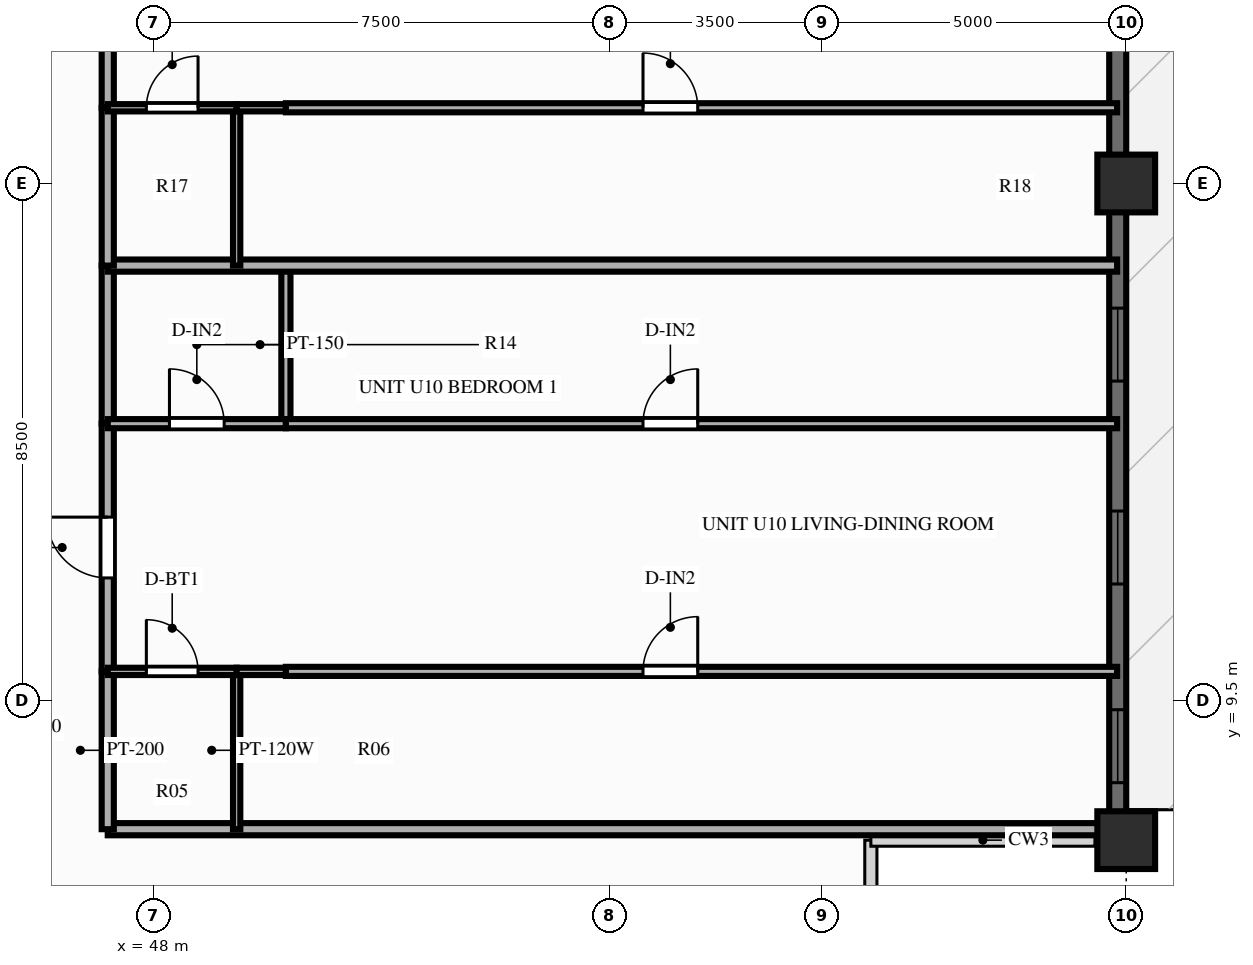
"""IFC4 building model, lengths in metres.
Left out: names, types, materials, properties, quantities, classifications, styles, units other than length and angle.
Written with IfcOpenShell. Run it as: python <this file> out.ifc"""

import sys

from ifc_helpers import new_model, si_unit, direction, frame, frame_2d, origin, origin_2d, place, context, subcontext, project, spatial, rectangle, extrude, source, transform, mapped, element, fill, save


model = new_model("IFC4")
c1 = context("Model", 3, precision=1e-05, world=origin(), true_north=direction((0.0, 1.0)))
c2 = subcontext(c1, "Body", "Model", "MODEL_VIEW")
j1 = project(units=[si_unit("LENGTHUNIT", "METRE"), si_unit("PLANEANGLEUNIT", "RADIAN")], contexts=[c1])
p1 = place(None, origin())
s1 = spatial("IfcSite", under=j1, at=p1, CompositionType="ELEMENT")
p2 = place(p1, origin())
s2 = spatial("IfcBuilding", under=s1, at=p2, CompositionType="ELEMENT")
p3 = place(p2, frame((0.0, 0.0, 107.85)))
s3 = spatial("IfcBuildingStorey", under=s2, at=p3, CompositionType="ELEMENT", Elevation=107.85)
m1 = source(origin(), c2, "Body", "SweptSolid", [
    extrude(rectangle(XDim=0.95, YDim=0.95, at=origin_2d()), origin(), (0.0, 0.0, 1.0), 3.0),
])
for number, where, z_axis, x_axis in (
    (1, (64.0, 7.2, 0.0), (0.0, 0.0, 1.0), (1.0, 0.0, 0.0)),
    (2, (64.0, 18.0, 0.0), (0.0, 0.0, 1.0), (1.0, 0.0, 0.0)),
):
    element("IfcColumn", number, at=place(p3, frame(where, z_axis=z_axis, x_axis=x_axis)), inside=s3, PredefinedType="COLUMN", context=c2, shape_type="MappedRepresentation", body=[
        mapped(m1, transform((0.0, 0.0, 0.0), scale=1.0)),
    ])
p4 = place(p3, frame((63.86, 7.2, 0.0), z_axis=(0.0, 0.0, 1.0), x_axis=(0.0, 1.0, 0.0)))
e3 = element("IfcWall", 3, at=p4, inside=s3, PredefinedType="SOLIDWALL", context=c2, shape_type="SweptSolid", body=[
    extrude(rectangle(XDim=39.6, YDim=0.28, at=frame_2d((19.8, 0.0))), origin(), (0.0, 0.0, 1.0), 2.28),
])
p5 = place(p4, frame((0.945, 0.0, 0.25)))
e4 = element("IfcOpeningElement", 4, at=p5, cuts=e3, PredefinedType="OPENING", context=c2, shape_type="SweptSolid", body=[
    extrude(rectangle(XDim=1.2, YDim=1.5, at=frame_2d((0.6, 0.75))), frame((0.0, 0.152, 0.0), z_axis=(0.0, -1.0, 0.0), x_axis=(1.0, 0.0, 0.0)), (0.0, 0.0, 1.0), 0.304),
])
p6 = place(p4, frame((4.213, 0.0, 0.25)))
e5 = element("IfcOpeningElement", 5, at=p6, cuts=e3, PredefinedType="OPENING", context=c2, shape_type="SweptSolid", body=[
    extrude(rectangle(XDim=1.2, YDim=1.5, at=frame_2d((0.6, 0.75))), frame((0.0, 0.152, 0.0), z_axis=(0.0, -1.0, 0.0), x_axis=(1.0, 0.0, 0.0)), (0.0, 0.0, 1.0), 0.304),
])
p7 = place(p4, frame((7.55, 0.0, 0.25)))
e6 = element("IfcOpeningElement", 6, at=p7, cuts=e3, PredefinedType="OPENING", context=c2, shape_type="SweptSolid", body=[
    extrude(rectangle(XDim=1.2, YDim=1.5, at=frame_2d((0.6, 0.75))), frame((0.0, 0.152, 0.0), z_axis=(0.0, -1.0, 0.0), x_axis=(1.0, 0.0, 0.0)), (0.0, 0.0, 1.0), 0.304),
])
p8 = place(p4, frame((13.483, 0.0, 0.25)))
e7 = element("IfcOpeningElement", 7, at=p8, cuts=e3, PredefinedType="OPENING", context=c2, shape_type="SweptSolid", body=[
    extrude(rectangle(XDim=1.2, YDim=1.5, at=frame_2d((0.6, 0.75))), frame((0.0, 0.152, 0.0), z_axis=(0.0, -1.0, 0.0), x_axis=(1.0, 0.0, 0.0)), (0.0, 0.0, 1.0), 0.304),
])
p9 = place(p4, frame((16.82, 0.0, 0.25)))
e8 = element("IfcOpeningElement", 8, at=p9, cuts=e3, PredefinedType="OPENING", context=c2, shape_type="SweptSolid", body=[
    extrude(rectangle(XDim=1.2, YDim=1.5, at=frame_2d((0.6, 0.75))), frame((0.0, 0.152, 0.0), z_axis=(0.0, -1.0, 0.0), x_axis=(1.0, 0.0, 0.0)), (0.0, 0.0, 1.0), 0.304),
])
p10 = place(p4, frame((19.2, 0.0, 0.25)))
e9 = element("IfcOpeningElement", 9, at=p10, cuts=e3, PredefinedType="OPENING", context=c2, shape_type="SweptSolid", body=[
    extrude(rectangle(XDim=1.2, YDim=1.5, at=frame_2d((0.6, 0.75))), frame((0.0, 0.152, 0.0), z_axis=(0.0, -1.0, 0.0), x_axis=(1.0, 0.0, 0.0)), (0.0, 0.0, 1.0), 0.304),
])
p11 = place(p4, frame((21.578, 0.0, 0.25)))
e10 = element("IfcOpeningElement", 10, at=p11, cuts=e3, PredefinedType="OPENING", context=c2, shape_type="SweptSolid", body=[
    extrude(rectangle(XDim=1.2, YDim=1.5, at=frame_2d((0.6, 0.75))), frame((0.0, 0.152, 0.0), z_axis=(0.0, -1.0, 0.0), x_axis=(1.0, 0.0, 0.0)), (0.0, 0.0, 1.0), 0.304),
])
p12 = place(p4, frame((26.313, 0.0, 0.0), z_axis=(0.0, 0.0, 1.0), x_axis=(-1.0, 0.0, 0.0)))
e11 = element("IfcOpeningElement", 11, at=p12, cuts=e3, PredefinedType="OPENING", context=c2, shape_type="SweptSolid", body=[
    extrude(rectangle(XDim=1.6, YDim=2.15, at=frame_2d((0.8, 1.075))), frame((0.0, 0.152, 0.0), z_axis=(0.0, -1.0, 0.0), x_axis=(1.0, 0.0, 0.0)), (0.0, 0.0, 1.0), 0.304),
])
p13 = place(p4, frame((29.305, 0.0, 0.25)))
e12 = element("IfcOpeningElement", 12, at=p13, cuts=e3, PredefinedType="OPENING", context=c2, shape_type="SweptSolid", body=[
    extrude(rectangle(XDim=0.7, YDim=1.5, at=frame_2d((0.35, 0.75))), frame((0.0, 0.152, 0.0), z_axis=(0.0, -1.0, 0.0), x_axis=(1.0, 0.0, 0.0)), (0.0, 0.0, 1.0), 0.304),
])
p14 = place(p4, frame((30.848, 0.0, 0.25)))
e13 = element("IfcOpeningElement", 13, at=p14, cuts=e3, PredefinedType="OPENING", context=c2, shape_type="SweptSolid", body=[
    extrude(rectangle(XDim=1.2, YDim=1.5, at=frame_2d((0.6, 0.75))), frame((0.0, 0.152, 0.0), z_axis=(0.0, -1.0, 0.0), x_axis=(1.0, 0.0, 0.0)), (0.0, 0.0, 1.0), 0.304),
])
p15 = place(p4, frame((34.183, 0.0, 0.25)))
e14 = element("IfcOpeningElement", 14, at=p15, cuts=e3, PredefinedType="OPENING", context=c2, shape_type="SweptSolid", body=[
    extrude(rectangle(XDim=1.2, YDim=1.5, at=frame_2d((0.6, 0.75))), frame((0.0, 0.152, 0.0), z_axis=(0.0, -1.0, 0.0), x_axis=(1.0, 0.0, 0.0)), (0.0, 0.0, 1.0), 0.304),
])
p16 = place(p4, frame((37.452, 0.0, 0.25)))
e15 = element("IfcOpeningElement", 15, at=p16, cuts=e3, PredefinedType="OPENING", context=c2, shape_type="SweptSolid", body=[
    extrude(rectangle(XDim=1.2, YDim=1.5, at=frame_2d((0.6, 0.75))), frame((0.0, 0.152, 0.0), z_axis=(0.0, -1.0, 0.0), x_axis=(1.0, 0.0, 0.0)), (0.0, 0.0, 1.0), 0.304),
])
p17 = place(p3, frame((47.25, 7.38, 0.0), z_axis=(0.0, 0.0, 1.0), x_axis=(1.0, 0.0, 0.0)))
e16 = element("IfcWall", 16, at=p17, inside=s3, PredefinedType="PARTITIONING", context=c2, shape_type="SweptSolid", body=[
    extrude(rectangle(XDim=16.6, YDim=0.2, at=frame_2d((8.3, 0.0))), origin(), (0.0, 0.0, 1.0), 2.79),
])
p18 = place(p3, frame((47.25, 7.38, 0.0), z_axis=(0.0, 0.0, 1.0), x_axis=(0.0, 1.0, 0.0)))
e17 = element("IfcWall", 17, at=p18, inside=s3, PredefinedType="PARTITIONING", context=c2, shape_type="SweptSolid", body=[
    extrude(rectangle(XDim=2.596, YDim=0.2, at=frame_2d((1.298, 0.0))), origin(), (0.0, 0.0, 1.0), 2.79),
])
p19 = place(p3, frame((47.25, 9.976, 0.0), z_axis=(0.0, 0.0, 1.0), x_axis=(0.0, 1.0, 0.0)))
e18 = element("IfcWall", 18, at=p19, inside=s3, PredefinedType="PARTITIONING", context=c2, shape_type="SweptSolid", body=[
    extrude(rectangle(XDim=4.074, YDim=0.2, at=frame_2d((2.037, 0.0))), origin(), (0.0, 0.0, 1.0), 2.79),
])
p20 = place(p19, frame((1.537, 0.0, 0.0)))
e19 = element("IfcOpeningElement", 19, at=p20, cuts=e18, PredefinedType="OPENING", context=c2, shape_type="SweptSolid", body=[
    extrude(rectangle(XDim=1.0, YDim=2.15, at=frame_2d((0.5, 1.075))), frame((0.0, 0.112, 0.0), z_axis=(0.0, -1.0, 0.0), x_axis=(1.0, 0.0, 0.0)), (0.0, 0.0, 1.0), 0.224),
])
p21 = place(p3, frame((47.25, 14.05, 0.0), z_axis=(0.0, 0.0, 1.0), x_axis=(0.0, 1.0, 0.0)))
e20 = element("IfcWall", 20, at=p21, inside=s3, PredefinedType="PARTITIONING", context=c2, shape_type="SweptSolid", body=[
    extrude(rectangle(XDim=2.6, YDim=0.2, at=frame_2d((1.3, 0.0))), origin(), (0.0, 0.0, 1.0), 2.79),
])
p22 = place(p3, frame((49.37, 7.38, 0.0), z_axis=(0.0, 0.0, 1.0), x_axis=(0.0, 1.0, 0.0)))
e21 = element("IfcWall", 21, at=p22, inside=s3, PredefinedType="PARTITIONING", context=c2, shape_type="SweptSolid", body=[
    extrude(rectangle(XDim=2.596, YDim=0.12, at=frame_2d((1.298, 0.0))), origin(), (0.0, 0.0, 1.0), 2.79),
])
p23 = place(p3, frame((50.18, 14.05, 0.0), z_axis=(0.0, 0.0, 1.0), x_axis=(0.0, 1.0, 0.0)))
e22 = element("IfcWall", 22, at=p23, inside=s3, PredefinedType="PARTITIONING", context=c2, shape_type="SweptSolid", body=[
    extrude(rectangle(XDim=2.6, YDim=0.15, at=frame_2d((1.3, 0.0))), origin(), (0.0, 0.0, 1.0), 2.79),
])
p24 = place(p3, frame((47.25, 9.976, 0.0), z_axis=(0.0, 0.0, 1.0), x_axis=(1.0, 0.0, 0.0)))
e23 = element("IfcWall", 23, at=p24, inside=s3, PredefinedType="PARTITIONING", context=c2, shape_type="SweptSolid", body=[
    extrude(rectangle(XDim=2.12, YDim=0.12, at=frame_2d((1.06, 0.0))), origin(), (0.0, 0.0, 1.0), 2.79),
])
p25 = place(p24, frame((0.635, 0.0, 0.0)))
e24 = element("IfcOpeningElement", 24, at=p25, cuts=e23, PredefinedType="OPENING", context=c2, shape_type="SweptSolid", body=[
    extrude(rectangle(XDim=0.85, YDim=2.05, at=frame_2d((0.425, 1.025))), frame((0.0, 0.072, 0.0), z_axis=(0.0, -1.0, 0.0), x_axis=(1.0, 0.0, 0.0)), (0.0, 0.0, 1.0), 0.144),
])
p26 = place(p3, frame((49.37, 9.976, 0.0), z_axis=(0.0, 0.0, 1.0), x_axis=(1.0, 0.0, 0.0)))
e25 = element("IfcWall", 25, at=p26, inside=s3, PredefinedType="PARTITIONING", context=c2, shape_type="SweptSolid", body=[
    extrude(rectangle(XDim=0.81, YDim=0.12, at=frame_2d((0.405, 0.0))), origin(), (0.0, 0.0, 1.0), 2.79),
])
p27 = place(p3, frame((50.18, 9.976, 0.0), z_axis=(0.0, 0.0, 1.0), x_axis=(1.0, 0.0, 0.0)))
e26 = element("IfcWall", 26, at=p27, inside=s3, PredefinedType="PARTITIONING", context=c2, shape_type="SweptSolid", body=[
    extrude(rectangle(XDim=13.67, YDim=0.15, at=frame_2d((6.835, 0.0))), origin(), (0.0, 0.0, 1.0), 2.79),
])
p28 = place(p27, frame((5.873, 0.0, 0.0)))
e27 = element("IfcOpeningElement", 27, at=p28, cuts=e26, PredefinedType="OPENING", context=c2, shape_type="SweptSolid", body=[
    extrude(rectangle(XDim=0.9, YDim=2.1, at=frame_2d((0.45, 1.05))), frame((0.0, 0.087, 0.0), z_axis=(0.0, -1.0, 0.0), x_axis=(1.0, 0.0, 0.0)), (0.0, 0.0, 1.0), 0.174),
])
p29 = place(p3, frame((47.25, 14.05, 0.0), z_axis=(0.0, 0.0, 1.0), x_axis=(1.0, 0.0, 0.0)))
e28 = element("IfcWall", 28, at=p29, inside=s3, PredefinedType="PARTITIONING", context=c2, shape_type="SweptSolid", body=[
    extrude(rectangle(XDim=2.93, YDim=0.15, at=frame_2d((1.465, 0.0))), origin(), (0.0, 0.0, 1.0), 2.79),
])
p30 = place(p29, frame((1.015, 0.0, 0.0)))
e29 = element("IfcOpeningElement", 29, at=p30, cuts=e28, PredefinedType="OPENING", context=c2, shape_type="SweptSolid", body=[
    extrude(rectangle(XDim=0.9, YDim=2.1, at=frame_2d((0.45, 1.05))), frame((0.0, 0.087, 0.0), z_axis=(0.0, -1.0, 0.0), x_axis=(1.0, 0.0, 0.0)), (0.0, 0.0, 1.0), 0.174),
])
p31 = place(p3, frame((50.18, 14.05, 0.0), z_axis=(0.0, 0.0, 1.0), x_axis=(1.0, 0.0, 0.0)))
e30 = element("IfcWall", 30, at=p31, inside=s3, PredefinedType="PARTITIONING", context=c2, shape_type="SweptSolid", body=[
    extrude(rectangle(XDim=13.67, YDim=0.15, at=frame_2d((6.835, 0.0))), origin(), (0.0, 0.0, 1.0), 2.79),
])
p32 = place(p31, frame((5.873, 0.0, 0.0)))
e31 = element("IfcOpeningElement", 31, at=p32, cuts=e30, PredefinedType="OPENING", context=c2, shape_type="SweptSolid", body=[
    extrude(rectangle(XDim=0.9, YDim=2.1, at=frame_2d((0.45, 1.05))), frame((0.0, 0.087, 0.0), z_axis=(0.0, -1.0, 0.0), x_axis=(1.0, 0.0, 0.0)), (0.0, 0.0, 1.0), 0.174),
])
p33 = place(p3, frame((47.25, 16.65, 0.0), z_axis=(0.0, 0.0, 1.0), x_axis=(1.0, 0.0, 0.0)))
e32 = element("IfcWall", 32, at=p33, inside=s3, PredefinedType="PARTITIONING", context=c2, shape_type="SweptSolid", body=[
    extrude(rectangle(XDim=16.6, YDim=0.2, at=frame_2d((8.3, 0.0))), origin(), (0.0, 0.0, 1.0), 2.79),
])
p34 = place(p3, frame((47.25, 16.65, 0.0), z_axis=(0.0, 0.0, 1.0), x_axis=(0.0, 1.0, 0.0)))
e33 = element("IfcWall", 33, at=p34, inside=s3, PredefinedType="PARTITIONING", context=c2, shape_type="SweptSolid", body=[
    extrude(rectangle(XDim=2.596, YDim=0.2, at=frame_2d((1.298, 0.0))), origin(), (0.0, 0.0, 1.0), 2.79),
])
p35 = place(p3, frame((47.25, 19.246, 0.0), z_axis=(0.0, 0.0, 1.0), x_axis=(0.0, 1.0, 0.0)))
e34 = element("IfcWall", 34, at=p35, inside=s3, PredefinedType="PARTITIONING", context=c2, shape_type="SweptSolid", body=[
    extrude(rectangle(XDim=4.074, YDim=0.2, at=frame_2d((2.037, 0.0))), origin(), (0.0, 0.0, 1.0), 2.79),
])
p36 = place(p35, frame((1.537, 0.0, 0.0)))
e35 = element("IfcOpeningElement", 35, at=p36, cuts=e34, PredefinedType="OPENING", context=c2, shape_type="SweptSolid", body=[
    extrude(rectangle(XDim=1.0, YDim=2.15, at=frame_2d((0.5, 1.075))), frame((0.0, 0.112, 0.0), z_axis=(0.0, -1.0, 0.0), x_axis=(1.0, 0.0, 0.0)), (0.0, 0.0, 1.0), 0.224),
])
p37 = place(p3, frame((49.37, 16.65, 0.0), z_axis=(0.0, 0.0, 1.0), x_axis=(0.0, 1.0, 0.0)))
e36 = element("IfcWall", 36, at=p37, inside=s3, PredefinedType="PARTITIONING", context=c2, shape_type="SweptSolid", body=[
    extrude(rectangle(XDim=2.596, YDim=0.12, at=frame_2d((1.298, 0.0))), origin(), (0.0, 0.0, 1.0), 2.79),
])
p38 = place(p3, frame((47.25, 19.246, 0.0), z_axis=(0.0, 0.0, 1.0), x_axis=(1.0, 0.0, 0.0)))
e37 = element("IfcWall", 37, at=p38, inside=s3, PredefinedType="PARTITIONING", context=c2, shape_type="SweptSolid", body=[
    extrude(rectangle(XDim=2.12, YDim=0.12, at=frame_2d((1.06, 0.0))), origin(), (0.0, 0.0, 1.0), 2.79),
])
p39 = place(p38, frame((0.635, 0.0, 0.0)))
e38 = element("IfcOpeningElement", 38, at=p39, cuts=e37, PredefinedType="OPENING", context=c2, shape_type="SweptSolid", body=[
    extrude(rectangle(XDim=0.85, YDim=2.05, at=frame_2d((0.425, 1.025))), frame((0.0, 0.072, 0.0), z_axis=(0.0, -1.0, 0.0), x_axis=(1.0, 0.0, 0.0)), (0.0, 0.0, 1.0), 0.144),
])
p40 = place(p3, frame((49.37, 19.246, 0.0), z_axis=(0.0, 0.0, 1.0), x_axis=(1.0, 0.0, 0.0)))
e39 = element("IfcWall", 39, at=p40, inside=s3, PredefinedType="PARTITIONING", context=c2, shape_type="SweptSolid", body=[
    extrude(rectangle(XDim=0.81, YDim=0.12, at=frame_2d((0.405, 0.0))), origin(), (0.0, 0.0, 1.0), 2.79),
])
p41 = place(p3, frame((50.18, 19.246, 0.0), z_axis=(0.0, 0.0, 1.0), x_axis=(1.0, 0.0, 0.0)))
e40 = element("IfcWall", 40, at=p41, inside=s3, PredefinedType="PARTITIONING", context=c2, shape_type="SweptSolid", body=[
    extrude(rectangle(XDim=13.67, YDim=0.15, at=frame_2d((6.835, 0.0))), origin(), (0.0, 0.0, 1.0), 2.79),
])
p42 = place(p41, frame((5.873, 0.0, 0.0)))
e41 = element("IfcOpeningElement", 41, at=p42, cuts=e40, PredefinedType="OPENING", context=c2, shape_type="SweptSolid", body=[
    extrude(rectangle(XDim=0.9, YDim=2.1, at=frame_2d((0.45, 1.05))), frame((0.0, 0.087, 0.0), z_axis=(0.0, -1.0, 0.0), x_axis=(1.0, 0.0, 0.0)), (0.0, 0.0, 1.0), 0.174),
])
m2 = source(origin(), c2, "Body", "SweptSolid", [
    extrude(rectangle(XDim=1.2, YDim=1.5, at=frame_2d((0.6, 0.75))), frame((0.0, 0.03, 0.0), z_axis=(0.0, -1.0, 0.0), x_axis=(1.0, 0.0, 0.0)), (0.0, 0.0, 1.0), 0.06),
])
p43 = place(p5, origin())
e42 = element("IfcWindow", 42, at=p43, inside=s3, PartitioningType="SINGLE_PANEL", PredefinedType="WINDOW", context=c2, shape_type="MappedRepresentation", body=[
    mapped(m2, transform((0.0, 0.0, 0.0), scale=1.0)),
])
fill(e4, e42)
p44 = place(p6, origin())
e43 = element("IfcWindow", 43, at=p44, inside=s3, PartitioningType="SINGLE_PANEL", PredefinedType="WINDOW", context=c2, shape_type="MappedRepresentation", body=[
    mapped(m2, transform((0.0, 0.0, 0.0), scale=1.0)),
])
fill(e5, e43)
p45 = place(p7, origin())
e44 = element("IfcWindow", 44, at=p45, inside=s3, PartitioningType="SINGLE_PANEL", PredefinedType="WINDOW", context=c2, shape_type="MappedRepresentation", body=[
    mapped(m2, transform((0.0, 0.0, 0.0), scale=1.0)),
])
fill(e6, e44)
m3 = source(origin(), c2, "Body", "SweptSolid", [
    extrude(rectangle(XDim=1.0, YDim=2.15, at=frame_2d((0.5, 1.075))), frame((0.0, 0.025, 0.0), z_axis=(0.0, -1.0, 0.0), x_axis=(1.0, 0.0, 0.0)), (0.0, 0.0, 1.0), 0.05),
])
p46 = place(p20, origin())
e45 = element("IfcDoor", 45, at=p46, inside=s3, OperationType="SINGLE_SWING_RIGHT", PredefinedType="DOOR", context=c2, shape_type="MappedRepresentation", body=[
    mapped(m3, transform((0.0, 0.0, 0.0), scale=1.0)),
])
fill(e19, e45)
m4 = source(origin(), c2, "Body", "SweptSolid", [
    extrude(rectangle(XDim=0.85, YDim=2.05, at=frame_2d((0.425, 1.025))), frame((0.0, 0.025, 0.0), z_axis=(0.0, -1.0, 0.0), x_axis=(1.0, 0.0, 0.0)), (0.0, 0.0, 1.0), 0.05),
])
p47 = place(p25, origin())
e46 = element("IfcDoor", 46, at=p47, inside=s3, OperationType="SINGLE_SWING_LEFT", PredefinedType="DOOR", context=c2, shape_type="MappedRepresentation", body=[
    mapped(m4, transform((0.0, 0.0, 0.0), scale=1.0)),
])
fill(e24, e46)
m5 = source(origin(), c2, "Body", "SweptSolid", [
    extrude(rectangle(XDim=0.9, YDim=2.1, at=frame_2d((0.45, 1.05))), frame((0.0, 0.025, 0.0), z_axis=(0.0, -1.0, 0.0), x_axis=(1.0, 0.0, 0.0)), (0.0, 0.0, 1.0), 0.05),
])
p48 = place(p28, origin())
e47 = element("IfcDoor", 47, at=p48, inside=s3, OperationType="SINGLE_SWING_RIGHT", PredefinedType="DOOR", context=c2, shape_type="MappedRepresentation", body=[
    mapped(m5, transform((0.0, 0.0, 0.0), scale=1.0)),
])
fill(e27, e47)
p49 = place(p30, origin())
e48 = element("IfcDoor", 48, at=p49, inside=s3, OperationType="SINGLE_SWING_LEFT", PredefinedType="DOOR", context=c2, shape_type="MappedRepresentation", body=[
    mapped(m5, transform((0.0, 0.0, 0.0), scale=1.0)),
])
fill(e29, e48)
p50 = place(p32, origin())
e49 = element("IfcDoor", 49, at=p50, inside=s3, OperationType="SINGLE_SWING_RIGHT", PredefinedType="DOOR", context=c2, shape_type="MappedRepresentation", body=[
    mapped(m5, transform((0.0, 0.0, 0.0), scale=1.0)),
])
fill(e31, e49)
p51 = place(p39, origin())
e50 = element("IfcDoor", 50, at=p51, inside=s3, OperationType="SINGLE_SWING_RIGHT", PredefinedType="DOOR", context=c2, shape_type="MappedRepresentation", body=[
    mapped(m4, transform((0.0, 0.0, 0.0), scale=1.0)),
])
fill(e38, e50)
p52 = place(p42, origin())
e51 = element("IfcDoor", 51, at=p52, inside=s3, OperationType="SINGLE_SWING_LEFT", PredefinedType="DOOR", context=c2, shape_type="MappedRepresentation", body=[
    mapped(m5, transform((0.0, 0.0, 0.0), scale=1.0)),
])
fill(e41, e51)
save(model, sys.argv[1])
